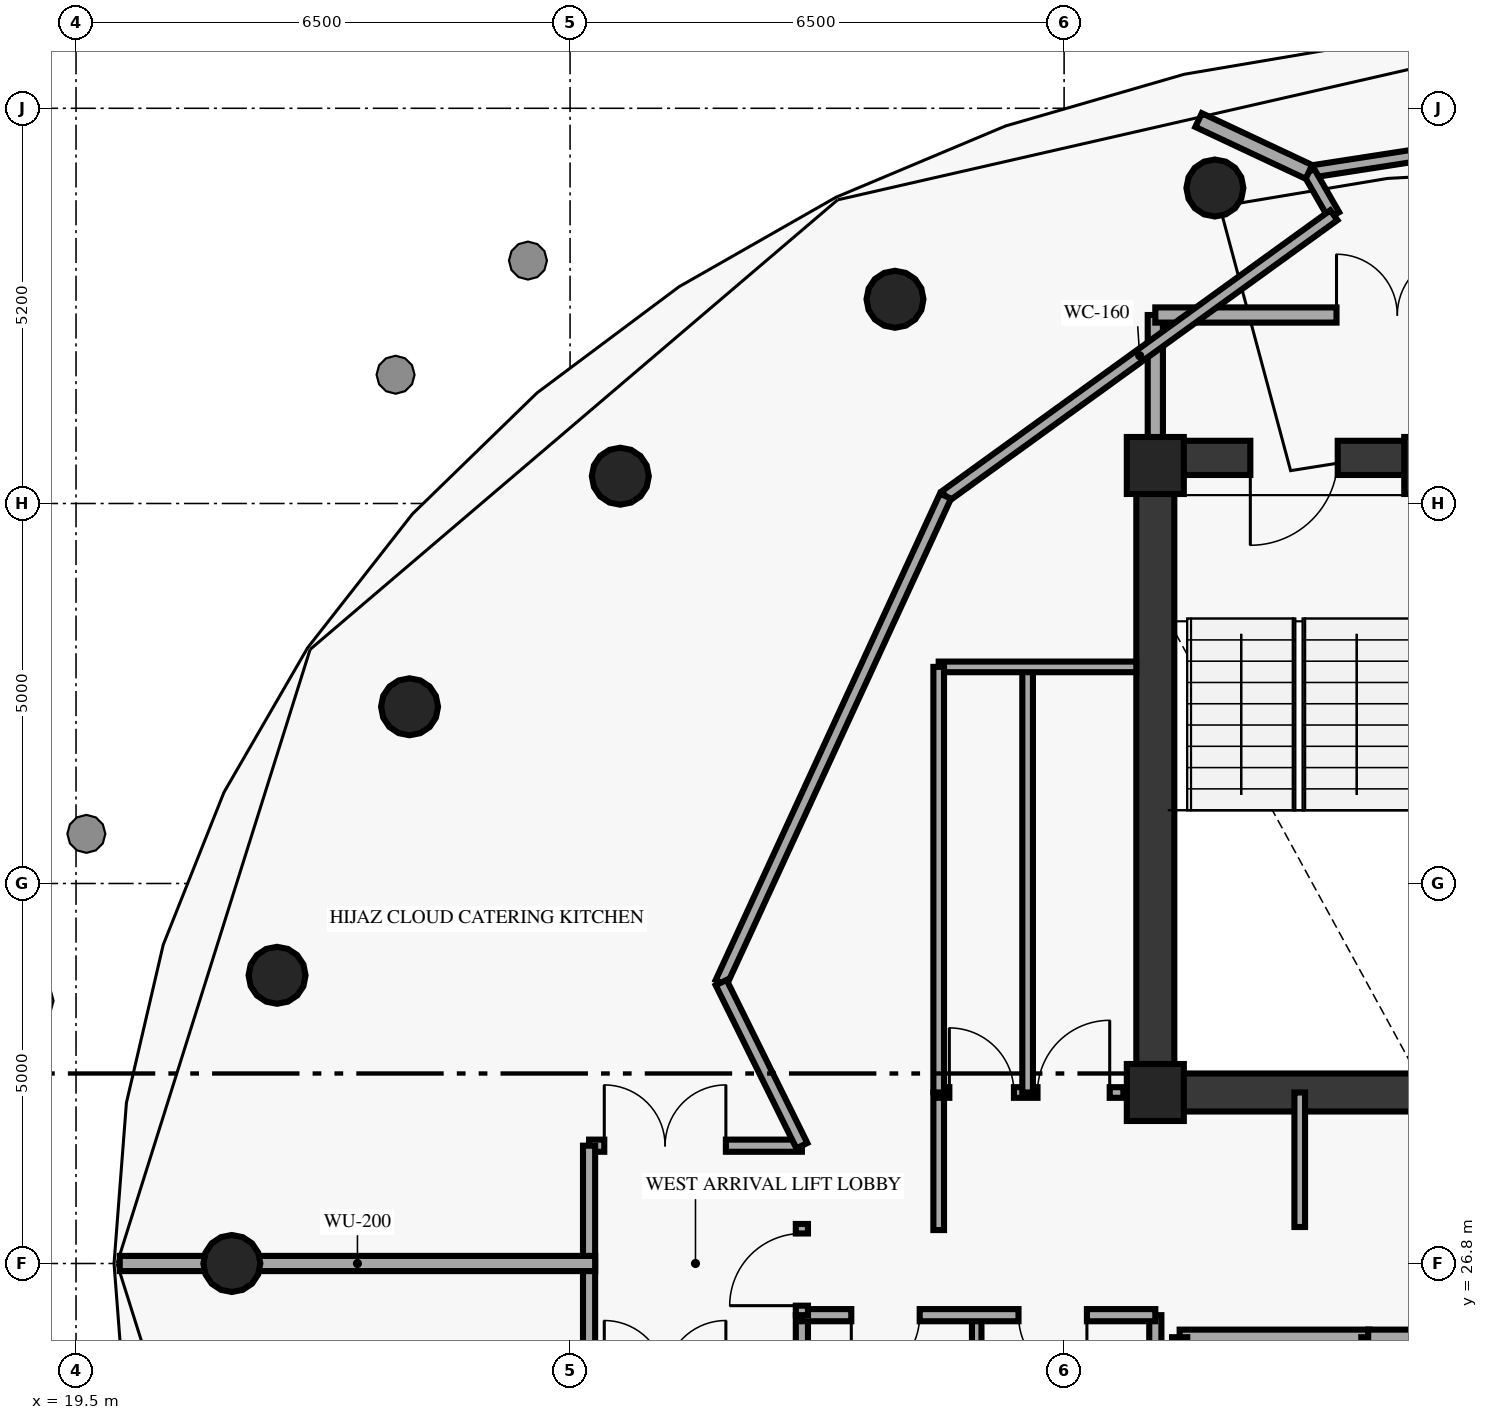
"""IFC4 building model, lengths in metres.
Left out: names, types, materials, properties, quantities, classifications, styles, units other than length and angle.
Written with IfcOpenShell. Run it as: python <this file> out.ifc"""

import sys

from ifc_helpers import new_model, si_unit, direction, frame, frame_2d, origin, origin_2d, place, context, subcontext, project, spatial, rectangle, circle, extrude, element, fill, save


model = new_model("IFC4")
c1 = context("Model", 3, precision=1e-05, world=origin(), true_north=direction((0.0, 1.0)))
c2 = subcontext(c1, "Body", "Model", "MODEL_VIEW")
j1 = project(units=[si_unit("LENGTHUNIT", "METRE"), si_unit("PLANEANGLEUNIT", "RADIAN")], contexts=[c1])
p1 = place(None, origin())
s1 = spatial("IfcSite", under=j1, at=p1, CompositionType="ELEMENT")
p2 = place(p1, origin())
s2 = spatial("IfcBuilding", under=s1, at=p2, CompositionType="ELEMENT")
p3 = place(p2, frame((0.0, 0.0, 306.8)))
s3 = spatial("IfcBuildingStorey", under=s2, at=p3, CompositionType="ELEMENT", Elevation=306.8)
for number, where, z_axis, x_axis in (
    (1, (37.35, 37.3, 0.0), (0.0, 0.0, 1.0), (1.0, 0.0, 0.0)),
    (2, (33.7, 37.3, 0.0), (0.0, 0.0, 1.0), (1.0, 0.0, 0.0)),
    (3, (33.7, 29.05, 0.0), (0.0, 0.0, 1.0), (1.0, 0.0, 0.0)),
):
    element("IfcColumn", number, at=place(p3, frame(where, z_axis=z_axis, x_axis=x_axis)), inside=s3, PredefinedType="PILASTER", context=c2, shape_type="SweptSolid", body=[
        extrude(rectangle(XDim=0.75, YDim=0.75, at=origin_2d()), origin(), (0.0, 0.0, 1.0), 6.18),
    ])
for number, where, z_axis, x_axis in (
    (4, (34.484, 40.951, 0.0), (0.0, 0.0, 1.0), (1.0, 0.0, 0.0)),
    (5, (30.275, 39.487, 0.0), (0.0, 0.0, 1.0), (1.0, 0.0, 0.0)),
    (6, (26.661, 37.159, 0.0), (0.0, 0.0, 1.0), (1.0, 0.0, 0.0)),
    (7, (23.888, 34.125, 0.0), (0.0, 0.0, 1.0), (1.0, 0.0, 0.0)),
    (8, (22.145, 30.592, 0.0), (0.0, 0.0, 1.0), (1.0, 0.0, 0.0)),
    (9, (21.55, 26.8, 0.0), (0.0, 0.0, 1.0), (1.0, 0.0, 0.0)),
):
    element("IfcColumn", number, at=place(p3, frame(where, z_axis=z_axis, x_axis=x_axis)), inside=s3, PredefinedType="COLUMN", context=c2, shape_type="SweptSolid", body=[
        extrude(circle(Radius=0.375, at=origin_2d()), origin(), (0.0, 0.0, 1.0), 6.18),
    ])
p4 = place(p3, frame((33.7, 29.05, 0.0), z_axis=(0.0, 0.0, 1.0), x_axis=(0.0, 1.0, 0.0)))
e10 = element("IfcWall", 10, at=p4, inside=s3, PredefinedType="SHEAR", context=c2, shape_type="SweptSolid", body=[
    extrude(rectangle(XDim=8.35, YDim=0.5, at=frame_2d((4.175, 0.0))), origin(), (0.0, 0.0, 1.0), 6.18),
])
p5 = place(p3, frame((33.7, 29.05, 0.0), z_axis=(0.0, 0.0, 1.0), x_axis=(1.0, 0.0, 0.0)))
e11 = element("IfcWall", 11, at=p5, inside=s3, PredefinedType="SHEAR", context=c2, shape_type="SweptSolid", body=[
    extrude(rectangle(XDim=10.6, YDim=0.5, at=frame_2d((5.3, 0.0))), origin(), (0.0, 0.0, 1.0), 6.18),
])
p6 = place(p3, frame((37.35, 37.4, 0.0), z_axis=(0.0, 0.0, 1.0), x_axis=(-1.0, 0.0, 0.0)))
e12 = element("IfcWall", 12, at=p6, inside=s3, PredefinedType="SHEAR", context=c2, shape_type="SweptSolid", body=[
    extrude(rectangle(XDim=3.65, YDim=0.45, at=frame_2d((1.825, 0.0))), origin(), (0.0, 0.0, 1.0), 6.18),
])
p7 = place(p6, frame((1.25, 0.0, 0.0)))
e13 = element("IfcOpeningElement", 13, at=p7, cuts=e12, PredefinedType="OPENING", context=c2, shape_type="SweptSolid", body=[
    extrude(rectangle(XDim=1.15, YDim=2.15, at=frame_2d((0.575, 1.075))), frame((0.0, 0.235, 0.0), z_axis=(0.0, -1.0, 0.0), x_axis=(1.0, 0.0, 0.0)), (0.0, 0.0, 1.0), 0.47),
])
p8 = place(p3, frame((33.7, 37.4, 0.0), z_axis=(0.0, 0.0, 1.0), x_axis=(0.0, 1.0, 0.0)))
e14 = element("IfcWall", 14, at=p8, inside=s3, PredefinedType="SOLIDWALL", context=c2, shape_type="SweptSolid", body=[
    extrude(rectangle(XDim=1.88, YDim=0.2, at=frame_2d((0.94, 0.0))), origin(), (0.0, 0.0, 1.0), 6.18),
])
p9 = place(p3, frame((38.9, 39.28, 0.0), z_axis=(0.0, 0.0, 1.0), x_axis=(-1.0, 0.0, 0.0)))
e15 = element("IfcWall", 15, at=p9, inside=s3, PredefinedType="SOLIDWALL", context=c2, shape_type="SweptSolid", body=[
    extrude(rectangle(XDim=5.2, YDim=0.2, at=frame_2d((2.6, 0.0))), origin(), (0.0, 0.0, 1.0), 6.18),
])
p10 = place(p9, frame((1.216, 0.0, 0.0)))
e16 = element("IfcOpeningElement", 16, at=p10, cuts=e15, PredefinedType="OPENING", context=c2, shape_type="SweptSolid", body=[
    extrude(rectangle(XDim=1.6, YDim=2.2, at=frame_2d((0.8, 1.1))), frame((0.0, 0.11, 0.0), z_axis=(0.0, -1.0, 0.0), x_axis=(1.0, 0.0, 0.0)), (0.0, 0.0, 1.0), 0.22),
])
p11 = place(p3, frame((35.6, 27.28, 0.0), z_axis=(0.0, 0.0, 1.0), x_axis=(0.0, 1.0, 0.0)))
e17 = element("IfcWall", 17, at=p11, inside=s3, PredefinedType="PARTITIONING", context=c2, shape_type="SweptSolid", body=[
    extrude(rectangle(XDim=1.77, YDim=0.14, at=frame_2d((0.885, 0.0))), origin(), (0.0, 0.0, 1.0), 6.18),
])
p12 = place(p3, frame((34.02, 25.83, 0.0), z_axis=(0.0, 0.0, 1.0), x_axis=(1.0, 0.0, 0.0)))
e18 = element("IfcWall", 18, at=p12, inside=s3, PredefinedType="SOLIDWALL", context=c2, shape_type="SweptSolid", body=[
    extrude(rectangle(XDim=2.5, YDim=0.2, at=frame_2d((1.25, 0.0))), origin(), (0.0, 0.0, 1.0), 6.18),
])
for number, where, z_axis, x_axis in (
    (19, (34.02, 23.42, 0.0), (0.0, 0.0, 1.0), (0.0, 1.0, 0.0)),
    (20, (36.51, 23.42, 0.0), (0.0, 0.0, 1.0), (0.0, 1.0, 0.0)),
):
    element("IfcWall", number, at=place(p3, frame(where, z_axis=z_axis, x_axis=x_axis)), inside=s3, PredefinedType="SOLIDWALL", context=c2, shape_type="SweptSolid", body=[
        extrude(rectangle(XDim=2.41, YDim=0.2, at=frame_2d((1.205, 0.0))), origin(), (0.0, 0.0, 1.0), 6.18),
    ])
p13 = place(p3, frame((36.5, 25.83, 0.0), z_axis=(0.0, 0.0, 1.0), x_axis=(1.0, 0.0, 0.0)))
e21 = element("IfcWall", 21, at=p13, inside=s3, PredefinedType="SOLIDWALL", context=c2, shape_type="SweptSolid", body=[
    extrude(rectangle(XDim=2.5, YDim=0.2, at=frame_2d((1.25, 0.0))), origin(), (0.0, 0.0, 1.0), 6.18),
])
p14 = place(p3, frame((29.05, 19.05, 0.0), z_axis=(0.0, 0.0, 1.0), x_axis=(0.0, 1.0, 0.0)))
e22 = element("IfcWall", 22, at=p14, inside=s3, PredefinedType="PARTITIONING", context=c2, shape_type="SweptSolid", body=[
    extrude(rectangle(XDim=7.07, YDim=0.16, at=frame_2d((3.535, 0.0))), origin(), (0.0, 0.0, 1.0), 6.18),
])
p15 = place(p3, frame((33.7, 23.45, 0.0), z_axis=(0.0, 0.0, 1.0), x_axis=(0.0, 1.0, 0.0)))
e23 = element("IfcWall", 23, at=p15, inside=s3, PredefinedType="PARTITIONING", context=c2, shape_type="SweptSolid", body=[
    extrude(rectangle(XDim=2.67, YDim=0.16, at=frame_2d((1.335, 0.0))), origin(), (0.0, 0.0, 1.0), 6.18),
])
p16 = place(p3, frame((31.35, 19.05, 0.0), z_axis=(0.0, 0.0, 1.0), x_axis=(0.0, 1.0, 0.0)))
e24 = element("IfcWall", 24, at=p16, inside=s3, PredefinedType="PARTITIONING", context=c2, shape_type="SweptSolid", body=[
    extrude(rectangle(XDim=7.07, YDim=0.125, at=frame_2d((3.535, 0.0))), origin(), (0.0, 0.0, 1.0), 6.18),
])
p17 = place(p3, frame((33.7, 26.12, 0.0), z_axis=(0.0, 0.0, 1.0), x_axis=(-1.0, 0.0, 0.0)))
e25 = element("IfcWall", 25, at=p17, inside=s3, PredefinedType="PARTITIONING", context=c2, shape_type="SweptSolid", body=[
    extrude(rectangle(XDim=4.65, YDim=0.16, at=frame_2d((2.325, 0.0))), origin(), (0.0, 0.0, 1.0), 6.18),
])
p18 = place(p17, frame((3.1, 0.0, 0.0)))
e26 = element("IfcOpeningElement", 26, at=p18, cuts=e25, PredefinedType="OPENING", context=c2, shape_type="SweptSolid", body=[
    extrude(rectangle(XDim=0.9, YDim=2.1, at=frame_2d((0.45, 1.05))), frame((0.0, 0.09, 0.0), z_axis=(0.0, -1.0, 0.0), x_axis=(1.0, 0.0, 0.0)), (0.0, 0.0, 1.0), 0.18),
])
p19 = place(p17, frame((0.9, 0.0, 0.0)))
e27 = element("IfcOpeningElement", 27, at=p19, cuts=e25, PredefinedType="OPENING", context=c2, shape_type="SweptSolid", body=[
    extrude(rectangle(XDim=0.9, YDim=2.1, at=frame_2d((0.45, 1.05))), frame((0.0, 0.09, 0.0), z_axis=(0.0, -1.0, 0.0), x_axis=(1.0, 0.0, 0.0)), (0.0, 0.0, 1.0), 0.18),
])
p20 = place(p3, frame((29.05, 26.12, 0.0), z_axis=(0.0, 0.0, 1.0), x_axis=(0.0, 1.0, 0.0)))
e28 = element("IfcWall", 28, at=p20, inside=s3, PredefinedType="PARTITIONING", context=c2, shape_type="SweptSolid", body=[
    extrude(rectangle(XDim=1.2, YDim=0.16, at=frame_2d((0.6, 0.0))), origin(), (0.0, 0.0, 1.0), 6.18),
])
p21 = place(p20, frame((0.125, 0.0, 0.0)))
e29 = element("IfcOpeningElement", 29, at=p21, cuts=e28, PredefinedType="OPENING", context=c2, shape_type="SweptSolid", body=[
    extrude(rectangle(XDim=0.95, YDim=2.15, at=frame_2d((0.475, 1.075))), frame((0.0, 0.09, 0.0), z_axis=(0.0, -1.0, 0.0), x_axis=(1.0, 0.0, 0.0)), (0.0, 0.0, 1.0), 0.18),
])
p22 = place(p3, frame((30.85, 27.24, 0.0), z_axis=(0.0, 0.0, 1.0), x_axis=(0.0, 1.0, 0.0)))
e30 = element("IfcWall", 30, at=p22, inside=s3, PredefinedType="PARTITIONING", context=c2, shape_type="SweptSolid", body=[
    extrude(rectangle(XDim=1.81, YDim=0.14, at=frame_2d((0.905, 0.0))), origin(), (0.0, 0.0, 1.0), 6.18),
])
p23 = place(p3, frame((30.85, 29.05, 0.0), z_axis=(0.0, 0.0, 1.0), x_axis=(1.0, 0.0, 0.0)))
e31 = element("IfcWall", 31, at=p23, inside=s3, PredefinedType="PARTITIONING", context=c2, shape_type="SweptSolid", body=[
    extrude(rectangle(XDim=2.43, YDim=0.14, at=frame_2d((1.215, 0.0))), origin(), (0.0, 0.0, 1.0), 6.18),
])
p24 = place(p23, frame((0.14, 0.0, 0.0)))
e32 = element("IfcOpeningElement", 32, at=p24, cuts=e31, PredefinedType="OPENING", context=c2, shape_type="SweptSolid", body=[
    extrude(rectangle(XDim=0.85, YDim=2.1, at=frame_2d((0.425, 1.05))), frame((0.0, 0.08, 0.0), z_axis=(0.0, -1.0, 0.0), x_axis=(1.0, 0.0, 0.0)), (0.0, 0.0, 1.0), 0.16),
])
p25 = place(p23, frame((1.3, 0.0, 0.0)))
e33 = element("IfcOpeningElement", 33, at=p25, cuts=e31, PredefinedType="OPENING", context=c2, shape_type="SweptSolid", body=[
    extrude(rectangle(XDim=0.95, YDim=2.1, at=frame_2d((0.475, 1.05))), frame((0.0, 0.08, 0.0), z_axis=(0.0, -1.0, 0.0), x_axis=(1.0, 0.0, 0.0)), (0.0, 0.0, 1.0), 0.16),
])
p26 = place(p3, frame((32.02, 29.05, 0.0), z_axis=(0.0, 0.0, 1.0), x_axis=(0.0, 1.0, 0.0)))
e34 = element("IfcWall", 34, at=p26, inside=s3, PredefinedType="PARTITIONING", context=c2, shape_type="SweptSolid", body=[
    extrude(rectangle(XDim=5.6, YDim=0.14, at=frame_2d((2.8, 0.0))), origin(), (0.0, 0.0, 1.0), 6.18),
])
p27 = place(p3, frame((30.85, 34.65, 0.0), z_axis=(0.0, 0.0, 1.0), x_axis=(1.0, 0.0, 0.0)))
e35 = element("IfcWall", 35, at=p27, inside=s3, PredefinedType="PARTITIONING", context=c2, shape_type="SweptSolid", body=[
    extrude(rectangle(XDim=2.6, YDim=0.14, at=frame_2d((1.3, 0.0))), origin(), (0.0, 0.0, 1.0), 6.18),
])
p28 = place(p3, frame((30.85, 29.05, 0.0), z_axis=(0.0, 0.0, 1.0), x_axis=(0.0, 1.0, 0.0)))
e36 = element("IfcWall", 36, at=p28, inside=s3, PredefinedType="PARTITIONING", context=c2, shape_type="SweptSolid", body=[
    extrude(rectangle(XDim=5.6, YDim=0.14, at=frame_2d((2.8, 0.0))), origin(), (0.0, 0.0, 1.0), 6.18),
])
p29 = place(p3, frame((39.0, 41.67, 0.0), z_axis=(0.0, 0.0, 1.0), x_axis=(-0.988264270775, -0.15275382519, 0.0)))
e37 = element("IfcWall", 37, at=p29, inside=s3, PredefinedType="PARTITIONING", context=c2, shape_type="SweptSolid", body=[
    extrude(rectangle(XDim=3.318, YDim=0.16, at=frame_2d((1.659, 0.0))), origin(), (0.0, 0.0, 1.0), 4.73),
])
p30 = place(p3, frame((36.049, 40.593, 0.0), z_axis=(0.0, 0.0, 1.0), x_axis=(-0.498854625265, 0.866685677078, 0.0)))
e38 = element("IfcWall", 38, at=p30, inside=s3, PredefinedType="PARTITIONING", context=c2, shape_type="SweptSolid", body=[
    extrude(rectangle(XDim=0.658, YDim=0.16, at=frame_2d((0.329, 0.0))), origin(), (0.0, 0.0, 1.0), 6.18),
])
p31 = place(p3, frame((35.721, 41.163, 0.0), z_axis=(0.0, 0.0, 1.0), x_axis=(-0.905146121581, 0.425100574672, 0.0)))
e39 = element("IfcWall", 39, at=p31, inside=s3, PredefinedType="PARTITIONING", context=c2, shape_type="SweptSolid", body=[
    extrude(rectangle(XDim=1.604, YDim=0.2, at=frame_2d((0.802, 0.0))), origin(), (0.0, 0.0, 1.0), 6.18),
])
p32 = place(p3, frame((36.049, 40.593, 0.0), z_axis=(0.0, 0.0, 1.0), x_axis=(-0.810271736342, -0.58605436035, 0.0)))
e40 = element("IfcWall", 40, at=p32, inside=s3, PredefinedType="PARTITIONING", context=c2, shape_type="SweptSolid", body=[
    extrude(rectangle(XDim=6.307, YDim=0.16, at=frame_2d((3.153, 0.0))), origin(), (0.0, 0.0, 1.0), 6.18),
])
p33 = place(p3, frame((30.939, 36.897, 0.0), z_axis=(0.0, 0.0, 1.0), x_axis=(-0.41866934876, -0.908138742929, 0.0)))
e41 = element("IfcWall", 41, at=p33, inside=s3, PredefinedType="PARTITIONING", context=c2, shape_type="SweptSolid", body=[
    extrude(rectangle(XDim=7.048, YDim=0.16, at=frame_2d((3.524, 0.0))), origin(), (0.0, 0.0, 1.0), 6.18),
])
p34 = place(p3, frame((26.25, 28.35, 0.0), z_axis=(0.0, 0.0, 1.0), x_axis=(1.0, 0.0, 0.0)))
e42 = element("IfcWall", 42, at=p34, inside=s3, PredefinedType="PARTITIONING", context=c2, shape_type="SweptSolid", body=[
    extrude(rectangle(XDim=2.8, YDim=0.16, at=frame_2d((1.4, 0.0))), origin(), (0.0, 0.0, 1.0), 6.18),
])
p35 = place(p34, frame((0.2, 0.0, 0.0)))
e43 = element("IfcOpeningElement", 43, at=p35, cuts=e42, PredefinedType="OPENING", context=c2, shape_type="SweptSolid", body=[
    extrude(rectangle(XDim=1.6, YDim=2.2, at=frame_2d((0.8, 1.1))), frame((0.0, 0.09, 0.0), z_axis=(0.0, -1.0, 0.0), x_axis=(1.0, 0.0, 0.0)), (0.0, 0.0, 1.0), 0.18),
])
p36 = place(p3, frame((26.25, 25.25, 0.0), z_axis=(0.0, 0.0, 1.0), x_axis=(0.0, 1.0, 0.0)))
e44 = element("IfcWall", 44, at=p36, inside=s3, PredefinedType="PARTITIONING", context=c2, shape_type="SweptSolid", body=[
    extrude(rectangle(XDim=3.1, YDim=0.16, at=frame_2d((1.55, 0.0))), origin(), (0.0, 0.0, 1.0), 6.18),
])
p37 = place(p3, frame((27.988, 30.496, 0.0), z_axis=(0.0, 0.0, 1.0), x_axis=(0.443539160525, -0.896254993337, 0.0)))
e45 = element("IfcWall", 45, at=p37, inside=s3, PredefinedType="PARTITIONING", context=c2, shape_type="SweptSolid", body=[
    extrude(rectangle(XDim=2.394, YDim=0.16, at=frame_2d((1.197, 0.0))), origin(), (0.0, 0.0, 1.0), 6.18),
])
p38 = place(p3, frame((26.33, 26.8, 0.0), z_axis=(0.0, 0.0, 1.0), x_axis=(-1.0, 0.0, 0.0)))
e46 = element("IfcWall", 46, at=p38, inside=s3, PredefinedType="PARTITIONING", context=c2, shape_type="SweptSolid", body=[
    extrude(rectangle(XDim=6.255, YDim=0.2, at=frame_2d((3.127, 0.0))), origin(), (0.0, 0.0, 1.0), 6.18),
])
p39 = place(p7, origin())
e47 = element("IfcDoor", 47, at=p39, inside=s3, OperationType="SINGLE_SWING_RIGHT", PredefinedType="DOOR", context=c2, shape_type="SweptSolid", body=[
    extrude(rectangle(XDim=1.15, YDim=2.15, at=frame_2d((0.575, 1.075))), frame((0.0, 0.025, 0.0), z_axis=(0.0, -1.0, 0.0), x_axis=(1.0, 0.0, 0.0)), (0.0, 0.0, 1.0), 0.05),
])
fill(e13, e47)
p40 = place(p10, origin())
e48 = element("IfcDoor", 48, at=p40, inside=s3, OperationType="DOUBLE_DOOR_SINGLE_SWING", PredefinedType="DOOR", context=c2, shape_type="SweptSolid", body=[
    extrude(rectangle(XDim=1.6, YDim=2.2, at=frame_2d((0.8, 1.1))), frame((0.0, 0.025, 0.0), z_axis=(0.0, -1.0, 0.0), x_axis=(1.0, 0.0, 0.0)), (0.0, 0.0, 1.0), 0.05),
])
fill(e16, e48)
p41 = place(p18, origin())
e49 = element("IfcDoor", 49, at=p41, inside=s3, OperationType="SINGLE_SWING_RIGHT", PredefinedType="DOOR", context=c2, shape_type="SweptSolid", body=[
    extrude(rectangle(XDim=0.9, YDim=2.1, at=frame_2d((0.45, 1.05))), frame((0.0, 0.025, 0.0), z_axis=(0.0, -1.0, 0.0), x_axis=(1.0, 0.0, 0.0)), (0.0, 0.0, 1.0), 0.05),
])
fill(e26, e49)
p42 = place(p19, origin())
e50 = element("IfcDoor", 50, at=p42, inside=s3, OperationType="SINGLE_SWING_LEFT", PredefinedType="DOOR", context=c2, shape_type="SweptSolid", body=[
    extrude(rectangle(XDim=0.9, YDim=2.1, at=frame_2d((0.45, 1.05))), frame((0.0, 0.025, 0.0), z_axis=(0.0, -1.0, 0.0), x_axis=(1.0, 0.0, 0.0)), (0.0, 0.0, 1.0), 0.05),
])
fill(e27, e50)
p43 = place(p21, origin())
e51 = element("IfcDoor", 51, at=p43, inside=s3, OperationType="SINGLE_SWING_RIGHT", PredefinedType="DOOR", context=c2, shape_type="SweptSolid", body=[
    extrude(rectangle(XDim=0.95, YDim=2.15, at=frame_2d((0.475, 1.075))), frame((0.0, 0.025, 0.0), z_axis=(0.0, -1.0, 0.0), x_axis=(1.0, 0.0, 0.0)), (0.0, 0.0, 1.0), 0.05),
])
fill(e29, e51)
p44 = place(p24, origin())
e52 = element("IfcDoor", 52, at=p44, inside=s3, OperationType="SINGLE_SWING_LEFT", PredefinedType="DOOR", context=c2, shape_type="SweptSolid", body=[
    extrude(rectangle(XDim=0.85, YDim=2.1, at=frame_2d((0.425, 1.05))), frame((0.0, 0.025, 0.0), z_axis=(0.0, -1.0, 0.0), x_axis=(1.0, 0.0, 0.0)), (0.0, 0.0, 1.0), 0.05),
])
fill(e32, e52)
p45 = place(p25, origin())
e53 = element("IfcDoor", 53, at=p45, inside=s3, OperationType="SINGLE_SWING_RIGHT", PredefinedType="DOOR", context=c2, shape_type="SweptSolid", body=[
    extrude(rectangle(XDim=0.95, YDim=2.1, at=frame_2d((0.475, 1.05))), frame((0.0, 0.025, 0.0), z_axis=(0.0, -1.0, 0.0), x_axis=(1.0, 0.0, 0.0)), (0.0, 0.0, 1.0), 0.05),
])
fill(e33, e53)
p46 = place(p35, origin())
e54 = element("IfcDoor", 54, at=p46, inside=s3, OperationType="DOUBLE_DOOR_SINGLE_SWING", PredefinedType="DOOR", context=c2, shape_type="SweptSolid", body=[
    extrude(rectangle(XDim=1.6, YDim=2.2, at=frame_2d((0.8, 1.1))), frame((0.0, 0.025, 0.0), z_axis=(0.0, -1.0, 0.0), x_axis=(1.0, 0.0, 0.0)), (0.0, 0.0, 1.0), 0.05),
])
fill(e43, e54)
save(model, sys.argv[1])
